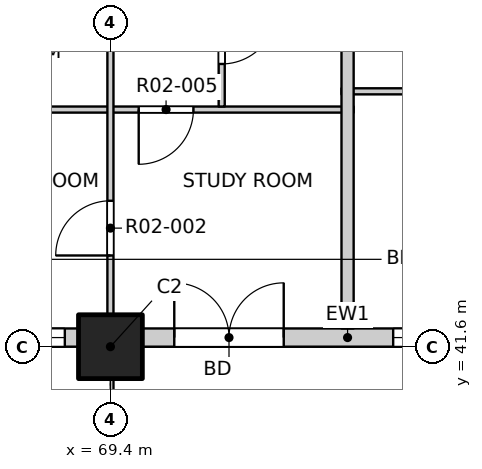
"""IFC4 building model, lengths in metres.
Left out: names, types, materials, properties, quantities, classifications, styles, units other than length and angle.
Written with IfcOpenShell. Run it as: python <this file> out.ifc"""

import sys

from ifc_helpers import new_model, si_unit, direction, frame, frame_2d, origin, origin_2d, place, context, subcontext, project, spatial, rectangle, extrude, element, fill, save


model = new_model("IFC4")
c1 = context("Model", 3, precision=1e-05, world=origin(), true_north=direction((0.0, 1.0)))
c2 = subcontext(c1, "Body", "Model", "MODEL_VIEW")
j1 = project(units=[si_unit("LENGTHUNIT", "METRE"), si_unit("PLANEANGLEUNIT", "RADIAN")], contexts=[c1])
p1 = place(None, origin())
s1 = spatial("IfcSite", under=j1, at=p1, CompositionType="ELEMENT")
p2 = place(p1, origin())
s2 = spatial("IfcBuilding", under=s1, at=p2, CompositionType="ELEMENT")
p3 = place(p2, frame((0.0, 0.0, 36.5)))
s3 = spatial("IfcBuildingStorey", under=s2, at=p3, CompositionType="ELEMENT", Elevation=36.5)
p4 = place(p3, frame((69.4, 41.6, -0.25), z_axis=(0.0, 0.0, 1.0), x_axis=(1.0, 0.0, 0.0)))
e1 = element("IfcColumn", 1, at=p4, inside=s3, PredefinedType="COLUMN", context=c2, shape_type="SweptSolid", body=[
    extrude(rectangle(XDim=1.05, YDim=1.05, at=origin_2d()), origin(), (0.0, 0.0, 1.0), 3.4),
])
p5 = place(p3, frame((65.5, 41.75, 0.0), z_axis=(0.0, 0.0, 1.0), x_axis=(1.0, 0.0, 0.0)))
e2 = element("IfcWall", 2, at=p5, inside=s3, PredefinedType="SOLIDWALL", context=c2, shape_type="SweptSolid", body=[
    extrude(rectangle(XDim=3.375, YDim=0.3, at=frame_2d((1.688, 0.0))), origin(), (0.0, 0.0, 1.0), 2.7),
])
p6 = place(p5, frame((0.75, 0.0, 0.9)))
e3 = element("IfcOpeningElement", 3, at=p6, cuts=e2, PredefinedType="OPENING", context=c2, shape_type="SweptSolid", body=[
    extrude(rectangle(XDim=2.4, YDim=1.8, at=frame_2d((1.2, 0.9))), frame((0.0, 0.16, 0.0), z_axis=(0.0, -1.0, 0.0), x_axis=(1.0, 0.0, 0.0)), (0.0, 0.0, 1.0), 0.32),
])
p7 = place(p3, frame((69.925, 41.75, 0.0), z_axis=(0.0, 0.0, 1.0), x_axis=(1.0, 0.0, 0.0)))
e4 = element("IfcWall", 4, at=p7, inside=s3, PredefinedType="SOLIDWALL", context=c2, shape_type="SweptSolid", body=[
    extrude(rectangle(XDim=6.75, YDim=0.3, at=frame_2d((3.375, 0.0))), origin(), (0.0, 0.0, 1.0), 2.7),
])
p8 = place(p7, frame((0.525, 0.0, 0.0)))
e5 = element("IfcOpeningElement", 5, at=p8, cuts=e4, PredefinedType="OPENING", context=c2, shape_type="SweptSolid", body=[
    extrude(rectangle(XDim=1.8, YDim=2.4, at=frame_2d((0.9, 1.2))), frame((0.0, 0.16, 0.0), z_axis=(0.0, -1.0, 0.0), x_axis=(1.0, 0.0, 0.0)), (0.0, 0.0, 1.0), 0.32),
])
p9 = place(p7, frame((4.125, 0.0, 0.9)))
e6 = element("IfcOpeningElement", 6, at=p9, cuts=e4, PredefinedType="OPENING", context=c2, shape_type="SweptSolid", body=[
    extrude(rectangle(XDim=2.4, YDim=1.8, at=frame_2d((1.2, 0.9))), frame((0.0, 0.16, 0.0), z_axis=(0.0, -1.0, 0.0), x_axis=(1.0, 0.0, 0.0)), (0.0, 0.0, 1.0), 0.32),
])
p10 = place(p3, frame((61.9, 45.5, 0.0), z_axis=(0.0, 0.0, 1.0), x_axis=(1.0, 0.0, 0.0)))
e7 = element("IfcWall", 7, at=p10, inside=s3, PredefinedType="PARTITIONING", context=c2, shape_type="SweptSolid", body=[
    extrude(rectangle(XDim=11.5, YDim=0.1, at=frame_2d((5.75, 0.0))), origin(), (0.0, 0.0, 1.0), 3.15),
])
p11 = place(p10, frame((7.965, 0.0, 0.0)))
e8 = element("IfcOpeningElement", 8, at=p11, cuts=e7, PredefinedType="OPENING", context=c2, shape_type="SweptSolid", body=[
    extrude(rectangle(XDim=0.9, YDim=2.1, at=frame_2d((0.45, 1.05))), frame((0.0, 0.06, 0.0), z_axis=(0.0, -1.0, 0.0), x_axis=(1.0, 0.0, 0.0)), (0.0, 0.0, 1.0), 0.12),
])
p12 = place(p3, frame((73.2, 45.8, 0.0), z_axis=(0.0, 0.0, 1.0), x_axis=(1.0, 0.0, 0.0)))
e9 = element("IfcWall", 9, at=p12, inside=s3, PredefinedType="PARTITIONING", context=c2, shape_type="SweptSolid", body=[
    extrude(rectangle(XDim=8.0, YDim=0.1, at=frame_2d((4.0, 0.0))), origin(), (0.0, 0.0, 1.0), 3.15),
])
p13 = place(p12, frame((1.45, 0.0, 0.0)))
e10 = element("IfcOpeningElement", 10, at=p13, cuts=e9, PredefinedType="OPENING", context=c2, shape_type="SweptSolid", body=[
    extrude(rectangle(XDim=1.2, YDim=2.1, at=frame_2d((0.6, 1.05))), frame((0.0, 0.06, 0.0), z_axis=(0.0, -1.0, 0.0), x_axis=(1.0, 0.0, 0.0)), (0.0, 0.0, 1.0), 0.12),
])
p14 = place(p12, frame((4.525, 0.0, 0.0)))
e11 = element("IfcOpeningElement", 11, at=p14, cuts=e9, PredefinedType="OPENING", context=c2, shape_type="SweptSolid", body=[
    extrude(rectangle(XDim=0.9, YDim=2.1, at=frame_2d((0.45, 1.05))), frame((0.0, 0.06, 0.0), z_axis=(0.0, -1.0, 0.0), x_axis=(1.0, 0.0, 0.0)), (0.0, 0.0, 1.0), 0.12),
])
p15 = place(p12, frame((6.475, 0.0, 0.0)))
e12 = element("IfcOpeningElement", 12, at=p15, cuts=e9, PredefinedType="OPENING", context=c2, shape_type="SweptSolid", body=[
    extrude(rectangle(XDim=0.9, YDim=2.1, at=frame_2d((0.45, 1.05))), frame((0.0, 0.06, 0.0), z_axis=(0.0, -1.0, 0.0), x_axis=(1.0, 0.0, 0.0)), (0.0, 0.0, 1.0), 0.12),
])
p16 = place(p3, frame((69.4, 41.9, 0.0), z_axis=(0.0, 0.0, 1.0), x_axis=(0.0, 1.0, 0.0)))
e13 = element("IfcWall", 13, at=p16, inside=s3, PredefinedType="PARTITIONING", context=c2, shape_type="SweptSolid", body=[
    extrude(rectangle(XDim=46.2, YDim=0.1, at=frame_2d((23.1, 0.0))), origin(), (0.0, 0.0, 1.0), 3.15),
])
p17 = place(p16, frame((1.2, 0.0, 0.0)))
e14 = element("IfcOpeningElement", 14, at=p17, cuts=e13, PredefinedType="OPENING", context=c2, shape_type="SweptSolid", body=[
    extrude(rectangle(XDim=0.9, YDim=2.1, at=frame_2d((0.45, 1.05))), frame((0.0, 0.06, 0.0), z_axis=(0.0, -1.0, 0.0), x_axis=(1.0, 0.0, 0.0)), (0.0, 0.0, 1.0), 0.12),
])
p18 = place(p16, frame((5.1, 0.0, 0.0)))
e15 = element("IfcOpeningElement", 15, at=p18, cuts=e13, PredefinedType="OPENING", context=c2, shape_type="SweptSolid", body=[
    extrude(rectangle(XDim=0.9, YDim=2.1, at=frame_2d((0.45, 1.05))), frame((0.0, 0.06, 0.0), z_axis=(0.0, -1.0, 0.0), x_axis=(1.0, 0.0, 0.0)), (0.0, 0.0, 1.0), 0.12),
])
p19 = place(p16, frame((9.975, 0.0, 0.0)))
e16 = element("IfcOpeningElement", 16, at=p19, cuts=e13, PredefinedType="OPENING", context=c2, shape_type="SweptSolid", body=[
    extrude(rectangle(XDim=0.9, YDim=2.1, at=frame_2d((0.45, 1.05))), frame((0.0, 0.06, 0.0), z_axis=(0.0, -1.0, 0.0), x_axis=(1.0, 0.0, 0.0)), (0.0, 0.0, 1.0), 0.12),
])
p20 = place(p16, frame((12.9, 0.0, 0.0)))
e17 = element("IfcOpeningElement", 17, at=p20, cuts=e13, PredefinedType="OPENING", context=c2, shape_type="SweptSolid", body=[
    extrude(rectangle(XDim=0.9, YDim=2.1, at=frame_2d((0.45, 1.05))), frame((0.0, 0.06, 0.0), z_axis=(0.0, -1.0, 0.0), x_axis=(1.0, 0.0, 0.0)), (0.0, 0.0, 1.0), 0.12),
])
p21 = place(p16, frame((17.775, 0.0, 0.0)))
e18 = element("IfcOpeningElement", 18, at=p21, cuts=e13, PredefinedType="OPENING", context=c2, shape_type="SweptSolid", body=[
    extrude(rectangle(XDim=0.9, YDim=2.1, at=frame_2d((0.45, 1.05))), frame((0.0, 0.06, 0.0), z_axis=(0.0, -1.0, 0.0), x_axis=(1.0, 0.0, 0.0)), (0.0, 0.0, 1.0), 0.12),
])
p22 = place(p16, frame((21.5, 0.0, 0.0)))
e19 = element("IfcOpeningElement", 19, at=p22, cuts=e13, PredefinedType="OPENING", context=c2, shape_type="SweptSolid", body=[
    extrude(rectangle(XDim=0.9, YDim=2.1, at=frame_2d((0.45, 1.05))), frame((0.0, 0.06, 0.0), z_axis=(0.0, -1.0, 0.0), x_axis=(1.0, 0.0, 0.0)), (0.0, 0.0, 1.0), 0.12),
])
p23 = place(p16, frame((24.6, 0.0, 0.0)))
e20 = element("IfcOpeningElement", 20, at=p23, cuts=e13, PredefinedType="OPENING", context=c2, shape_type="SweptSolid", body=[
    extrude(rectangle(XDim=0.9, YDim=2.1, at=frame_2d((0.45, 1.05))), frame((0.0, 0.06, 0.0), z_axis=(0.0, -1.0, 0.0), x_axis=(1.0, 0.0, 0.0)), (0.0, 0.0, 1.0), 0.12),
])
p24 = place(p16, frame((29.3, 0.0, 0.0)))
e21 = element("IfcOpeningElement", 21, at=p24, cuts=e13, PredefinedType="OPENING", context=c2, shape_type="SweptSolid", body=[
    extrude(rectangle(XDim=0.9, YDim=2.1, at=frame_2d((0.45, 1.05))), frame((0.0, 0.06, 0.0), z_axis=(0.0, -1.0, 0.0), x_axis=(1.0, 0.0, 0.0)), (0.0, 0.0, 1.0), 0.12),
])
p25 = place(p16, frame((33.375, 0.0, 0.0)))
e22 = element("IfcOpeningElement", 22, at=p25, cuts=e13, PredefinedType="OPENING", context=c2, shape_type="SweptSolid", body=[
    extrude(rectangle(XDim=0.9, YDim=2.1, at=frame_2d((0.45, 1.05))), frame((0.0, 0.06, 0.0), z_axis=(0.0, -1.0, 0.0), x_axis=(1.0, 0.0, 0.0)), (0.0, 0.0, 1.0), 0.12),
])
p26 = place(p16, frame((37.1, 0.0, 0.0)))
e23 = element("IfcOpeningElement", 23, at=p26, cuts=e13, PredefinedType="OPENING", context=c2, shape_type="SweptSolid", body=[
    extrude(rectangle(XDim=0.9, YDim=2.1, at=frame_2d((0.45, 1.05))), frame((0.0, 0.06, 0.0), z_axis=(0.0, -1.0, 0.0), x_axis=(1.0, 0.0, 0.0)), (0.0, 0.0, 1.0), 0.12),
])
p27 = place(p16, frame((41.175, 0.0, 0.0)))
e24 = element("IfcOpeningElement", 24, at=p27, cuts=e13, PredefinedType="OPENING", context=c2, shape_type="SweptSolid", body=[
    extrude(rectangle(XDim=0.9, YDim=2.1, at=frame_2d((0.45, 1.05))), frame((0.0, 0.06, 0.0), z_axis=(0.0, -1.0, 0.0), x_axis=(1.0, 0.0, 0.0)), (0.0, 0.0, 1.0), 0.12),
])
p28 = place(p16, frame((44.1, 0.0, 0.0)))
e25 = element("IfcOpeningElement", 25, at=p28, cuts=e13, PredefinedType="OPENING", context=c2, shape_type="SweptSolid", body=[
    extrude(rectangle(XDim=0.9, YDim=2.1, at=frame_2d((0.45, 1.05))), frame((0.0, 0.06, 0.0), z_axis=(0.0, -1.0, 0.0), x_axis=(1.0, 0.0, 0.0)), (0.0, 0.0, 1.0), 0.12),
])
p29 = place(p3, frame((71.23, 45.55, 0.0), z_axis=(0.0, 0.0, 1.0), x_axis=(0.0, 1.0, 0.0)))
e26 = element("IfcWall", 26, at=p29, inside=s3, PredefinedType="PARTITIONING", context=c2, shape_type="SweptSolid", body=[
    extrude(rectangle(XDim=9.2, YDim=0.1, at=frame_2d((4.6, 0.0))), origin(), (0.0, 0.0, 1.0), 3.15),
])
p30 = place(p29, frame((0.7, 0.0, 0.0)))
e27 = element("IfcOpeningElement", 27, at=p30, cuts=e26, PredefinedType="OPENING", context=c2, shape_type="SweptSolid", body=[
    extrude(rectangle(XDim=0.9, YDim=2.1, at=frame_2d((0.45, 1.05))), frame((0.0, 0.06, 0.0), z_axis=(0.0, -1.0, 0.0), x_axis=(1.0, 0.0, 0.0)), (0.0, 0.0, 1.0), 0.12),
])
p31 = place(p29, frame((3.1, 0.0, 0.0)))
e28 = element("IfcOpeningElement", 28, at=p31, cuts=e26, PredefinedType="OPENING", context=c2, shape_type="SweptSolid", body=[
    extrude(rectangle(XDim=0.8, YDim=2.1, at=frame_2d((0.4, 1.05))), frame((0.0, 0.06, 0.0), z_axis=(0.0, -1.0, 0.0), x_axis=(1.0, 0.0, 0.0)), (0.0, 0.0, 1.0), 0.12),
])
p32 = place(p29, frame((5.4, 0.0, 0.0)))
e29 = element("IfcOpeningElement", 29, at=p32, cuts=e26, PredefinedType="OPENING", context=c2, shape_type="SweptSolid", body=[
    extrude(rectangle(XDim=0.8, YDim=2.1, at=frame_2d((0.4, 1.05))), frame((0.0, 0.06, 0.0), z_axis=(0.0, -1.0, 0.0), x_axis=(1.0, 0.0, 0.0)), (0.0, 0.0, 1.0), 0.12),
])
p33 = place(p29, frame((7.7, 0.0, 0.0)))
e30 = element("IfcOpeningElement", 30, at=p33, cuts=e26, PredefinedType="OPENING", context=c2, shape_type="SweptSolid", body=[
    extrude(rectangle(XDim=0.8, YDim=2.1, at=frame_2d((0.4, 1.05))), frame((0.0, 0.06, 0.0), z_axis=(0.0, -1.0, 0.0), x_axis=(1.0, 0.0, 0.0)), (0.0, 0.0, 1.0), 0.12),
])
p34 = place(p3, frame((73.3, 41.9, 0.0), z_axis=(0.0, 0.0, 1.0), x_axis=(0.0, 1.0, 0.0)))
e31 = element("IfcWall", 31, at=p34, inside=s3, PredefinedType="PARTITIONING", context=c2, shape_type="SweptSolid", body=[
    extrude(rectangle(XDim=11.3, YDim=0.2, at=frame_2d((5.65, 0.0))), origin(), (0.0, 0.0, 1.0), 3.15),
])
p35 = place(p6, origin())
e32 = element("IfcWindow", 32, at=p35, inside=s3, PartitioningType="DOUBLE_PANEL_VERTICAL", PredefinedType="WINDOW", context=c2, shape_type="SweptSolid", body=[
    extrude(rectangle(XDim=2.4, YDim=1.8, at=frame_2d((1.2, 0.9))), frame((0.0, 0.03, 0.0), z_axis=(0.0, -1.0, 0.0), x_axis=(1.0, 0.0, 0.0)), (0.0, 0.0, 1.0), 0.06),
])
fill(e3, e32)
p36 = place(p8, origin())
e33 = element("IfcDoor", 33, at=p36, inside=s3, OperationType="DOUBLE_DOOR_SINGLE_SWING", PredefinedType="DOOR", context=c2, shape_type="SweptSolid", body=[
    extrude(rectangle(XDim=1.8, YDim=2.4, at=frame_2d((0.9, 1.2))), frame((0.0, 0.025, 0.0), z_axis=(0.0, -1.0, 0.0), x_axis=(1.0, 0.0, 0.0)), (0.0, 0.0, 1.0), 0.05),
])
fill(e5, e33)
p37 = place(p9, origin())
e34 = element("IfcWindow", 34, at=p37, inside=s3, PartitioningType="DOUBLE_PANEL_VERTICAL", PredefinedType="WINDOW", context=c2, shape_type="SweptSolid", body=[
    extrude(rectangle(XDim=2.4, YDim=1.8, at=frame_2d((1.2, 0.9))), frame((0.0, 0.03, 0.0), z_axis=(0.0, -1.0, 0.0), x_axis=(1.0, 0.0, 0.0)), (0.0, 0.0, 1.0), 0.06),
])
fill(e6, e34)
p38 = place(p17, origin())
e35 = element("IfcDoor", 35, at=p38, inside=s3, OperationType="SINGLE_SWING_LEFT", PredefinedType="DOOR", context=c2, shape_type="SweptSolid", body=[
    extrude(rectangle(XDim=0.9, YDim=2.1, at=frame_2d((0.45, 1.05))), frame((0.0, 0.025, 0.0), z_axis=(0.0, -1.0, 0.0), x_axis=(1.0, 0.0, 0.0)), (0.0, 0.0, 1.0), 0.05),
])
fill(e14, e35)
p39 = place(p11, origin())
e36 = element("IfcDoor", 36, at=p39, inside=s3, OperationType="SINGLE_SWING_RIGHT", PredefinedType="DOOR", context=c2, shape_type="SweptSolid", body=[
    extrude(rectangle(XDim=0.9, YDim=2.1, at=frame_2d((0.45, 1.05))), frame((0.0, 0.025, 0.0), z_axis=(0.0, -1.0, 0.0), x_axis=(1.0, 0.0, 0.0)), (0.0, 0.0, 1.0), 0.05),
])
fill(e8, e36)
p40 = place(p30, origin())
e37 = element("IfcDoor", 37, at=p40, inside=s3, OperationType="SINGLE_SWING_LEFT", PredefinedType="DOOR", context=c2, shape_type="SweptSolid", body=[
    extrude(rectangle(XDim=0.9, YDim=2.1, at=frame_2d((0.45, 1.05))), frame((0.0, 0.025, 0.0), z_axis=(0.0, -1.0, 0.0), x_axis=(1.0, 0.0, 0.0)), (0.0, 0.0, 1.0), 0.05),
])
fill(e27, e37)
save(model, sys.argv[1])
